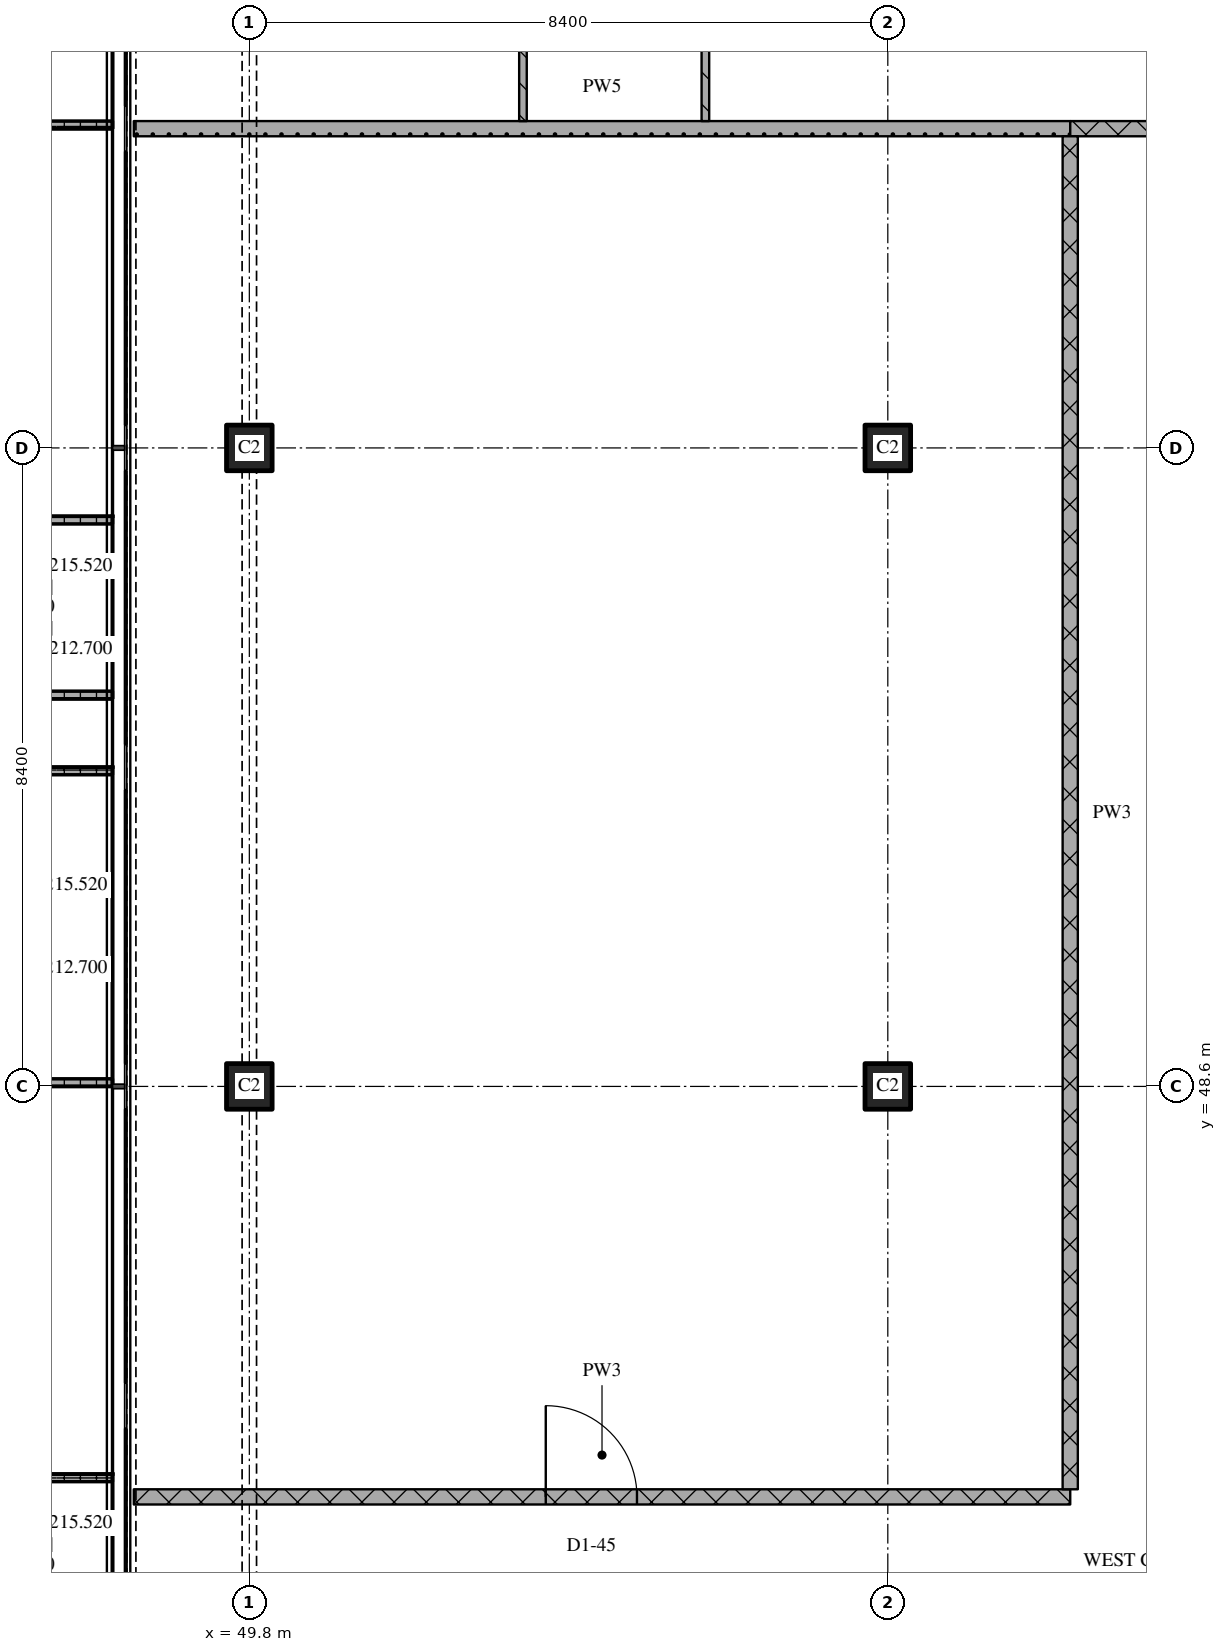
"""IFC4 building model, lengths in metres.
Left out: names, types, materials, properties, quantities, classifications, styles, units other than length and angle.
Written with IfcOpenShell. Run it as: python <this file> out.ifc"""

import sys

from ifc_helpers import new_model, si_unit, direction, frame, frame_2d, origin, origin_2d, place, context, subcontext, project, spatial, polyline, rectangle, outline, extrude, element, fill, save


model = new_model("IFC4")
c1 = context("Model", 3, precision=1e-05, world=origin(), true_north=direction((0.0, 1.0)))
c2 = subcontext(c1, "Body", "Model", "MODEL_VIEW")
j1 = project(units=[si_unit("LENGTHUNIT", "METRE"), si_unit("PLANEANGLEUNIT", "RADIAN")], contexts=[c1])
p1 = place(None, origin())
s1 = spatial("IfcSite", under=j1, at=p1, CompositionType="ELEMENT")
p2 = place(p1, origin())
s2 = spatial("IfcBuilding", under=s1, at=p2, CompositionType="ELEMENT")
p3 = place(p2, frame((0.0, 0.0, 212.7)))
s3 = spatial("IfcBuildingStorey", under=s2, at=p3, CompositionType="ELEMENT", Elevation=212.7)
for number, where, z_axis, x_axis in (
    (1, (49.8, 48.6, 0.0), (0.0, 0.0, 1.0), (1.0, 0.0, 0.0)),
    (2, (49.8, 57.0, 0.0), (0.0, 0.0, 1.0), (1.0, 0.0, 0.0)),
    (3, (58.2, 48.6, 0.0), (0.0, 0.0, 1.0), (1.0, 0.0, 0.0)),
    (4, (58.2, 57.0, 0.0), (0.0, 0.0, 1.0), (1.0, 0.0, 0.0)),
):
    element("IfcColumn", number, at=place(p3, frame(where, z_axis=z_axis, x_axis=x_axis)), inside=s3, PredefinedType="COLUMN", context=c2, shape_type="SweptSolid", body=[
        extrude(rectangle(XDim=0.6, YDim=0.6, at=origin_2d()), origin(), (0.0, 0.0, 1.0), 3.6),
    ])
p4 = place(p3, origin())
e5 = element("IfcWall", 5, at=p4, inside=s3, PredefinedType="SOLIDWALL", context=c2, shape_type="SweptSolid", body=[
    extrude(outline(polyline([(48.0, 65.4), (48.0, 65.3), (46.367, 65.3), (46.367, 61.3), (48.0, 61.3), (48.0, 61.2), (46.267, 61.2), (46.267, 65.4), (48.0, 65.4)])), origin(), (0.0, 0.0, 1.0), 1.0),
])
p5 = place(p3, origin())
e6 = element("IfcWall", 6, at=p5, inside=s3, PredefinedType="SOLIDWALL", context=c2, shape_type="SweptSolid", body=[
    extrude(outline(polyline([(48.0, 56.1), (48.0, 56.0), (46.5, 56.0), (46.5, 53.8), (48.0, 53.8), (48.0, 53.7), (46.4, 53.7), (46.4, 56.1), (48.0, 56.1)])), origin(), (0.0, 0.0, 1.0), 1.0),
])
p6 = place(p3, origin())
e7 = element("IfcWall", 7, at=p6, inside=s3, PredefinedType="SOLIDWALL", context=c2, shape_type="SweptSolid", body=[
    extrude(outline(polyline([(48.0, 52.8), (48.0, 52.7), (46.367, 52.7), (46.367, 48.7), (48.0, 48.7), (48.0, 48.6), (46.267, 48.6), (46.267, 52.8), (48.0, 52.8)])), origin(), (0.0, 0.0, 1.0), 1.0),
])
p7 = place(p3, origin())
e8 = element("IfcWall", 8, at=p7, inside=s3, PredefinedType="SOLIDWALL", context=c2, shape_type="SweptSolid", body=[
    extrude(outline(polyline([(48.0, 43.5), (48.0, 43.4), (46.5, 43.4), (46.5, 41.2), (48.0, 41.2), (48.0, 41.1), (46.4, 41.1), (46.4, 43.5), (48.0, 43.5)])), origin(), (0.0, 0.0, 1.0), 1.0),
])
p8 = place(p3, frame((48.28, 43.2, 0.0), z_axis=(0.0, 0.0, 1.0), x_axis=(1.0, 0.0, 0.0)))
e9 = element("IfcWall", 9, at=p8, inside=s3, PredefinedType="PARTITIONING", context=c2, shape_type="SweptSolid", body=[
    extrude(rectangle(XDim=12.32, YDim=0.2, at=frame_2d((6.16, 0.0))), origin(), (0.0, 0.0, 1.0), 3.32),
])
p9 = place(p8, frame((5.42, 0.0, 0.0)))
e10 = element("IfcOpeningElement", 10, at=p9, cuts=e9, PredefinedType="OPENING", context=c2, shape_type="SweptSolid", body=[
    extrude(rectangle(XDim=1.2, YDim=2.1, at=frame_2d((0.6, 1.05))), frame((0.0, 0.11, 0.0), z_axis=(0.0, -1.0, 0.0), x_axis=(1.0, 0.0, 0.0)), (0.0, 0.0, 1.0), 0.22),
])
p10 = place(p3, frame((60.6, 61.2, 0.0), z_axis=(0.0, 0.0, 1.0), x_axis=(1.0, 0.0, 0.0)))
e11 = element("IfcWall", 11, at=p10, inside=s3, PredefinedType="PARTITIONING", context=c2, shape_type="SweptSolid", body=[
    extrude(rectangle(XDim=3.6, YDim=0.2, at=frame_2d((1.8, 0.0))), origin(), (0.0, 0.0, 1.0), 3.32),
])
p11 = place(p3, frame((48.28, 61.2, 0.0), z_axis=(0.0, 0.0, 1.0), x_axis=(1.0, 0.0, 0.0)))
e12 = element("IfcWall", 12, at=p11, inside=s3, PredefinedType="PARTITIONING", context=c2, shape_type="SweptSolid", body=[
    extrude(rectangle(XDim=12.32, YDim=0.2, at=frame_2d((6.16, 0.0))), origin(), (0.0, 0.0, 1.0), 3.32),
])
p12 = place(p3, frame((53.4, 69.55, 0.0), z_axis=(0.0, 0.0, 1.0), x_axis=(0.0, -1.0, 0.0)))
e13 = element("IfcWall", 13, at=p12, inside=s3, PredefinedType="PARTITIONING", context=c2, shape_type="SweptSolid", body=[
    extrude(rectangle(XDim=8.25, YDim=0.1, at=frame_2d((4.125, 0.0))), origin(), (0.0, 0.0, 1.0), 3.32),
])
p13 = place(p3, frame((55.8, 67.15, 0.0), z_axis=(0.0, 0.0, 1.0), x_axis=(0.0, -1.0, 0.0)))
e14 = element("IfcWall", 14, at=p13, inside=s3, PredefinedType="PARTITIONING", context=c2, shape_type="SweptSolid", body=[
    extrude(rectangle(XDim=5.85, YDim=0.1, at=frame_2d((2.925, 0.0))), origin(), (0.0, 0.0, 1.0), 3.32),
])
p14 = place(p13, frame((3.973, 0.0, 0.0)))
e15 = element("IfcOpeningElement", 15, at=p14, cuts=e14, PredefinedType="OPENING", context=c2, shape_type="SweptSolid", body=[
    extrude(rectangle(XDim=0.8, YDim=2.1, at=frame_2d((0.4, 1.05))), frame((0.0, 0.06, 0.0), z_axis=(0.0, -1.0, 0.0), x_axis=(1.0, 0.0, 0.0)), (0.0, 0.0, 1.0), 0.12),
])
p15 = place(p3, frame((60.6, 61.1, 0.0), z_axis=(0.0, 0.0, 1.0), x_axis=(0.0, -1.0, 0.0)))
e16 = element("IfcWall", 16, at=p15, inside=s3, PredefinedType="PARTITIONING", context=c2, shape_type="SweptSolid", body=[
    extrude(rectangle(XDim=17.8, YDim=0.2, at=frame_2d((8.9, 0.0))), origin(), (0.0, 0.0, 1.0), 3.32),
])
p16 = place(p9, origin())
e17 = element("IfcDoor", 17, at=p16, inside=s3, OperationType="SINGLE_SWING_LEFT", PredefinedType="DOOR", context=c2, shape_type="SweptSolid", body=[
    extrude(rectangle(XDim=1.2, YDim=2.1, at=frame_2d((0.6, 1.05))), frame((0.0, 0.025, 0.0), z_axis=(0.0, -1.0, 0.0), x_axis=(1.0, 0.0, 0.0)), (0.0, 0.0, 1.0), 0.05),
])
fill(e10, e17)
save(model, sys.argv[1])
